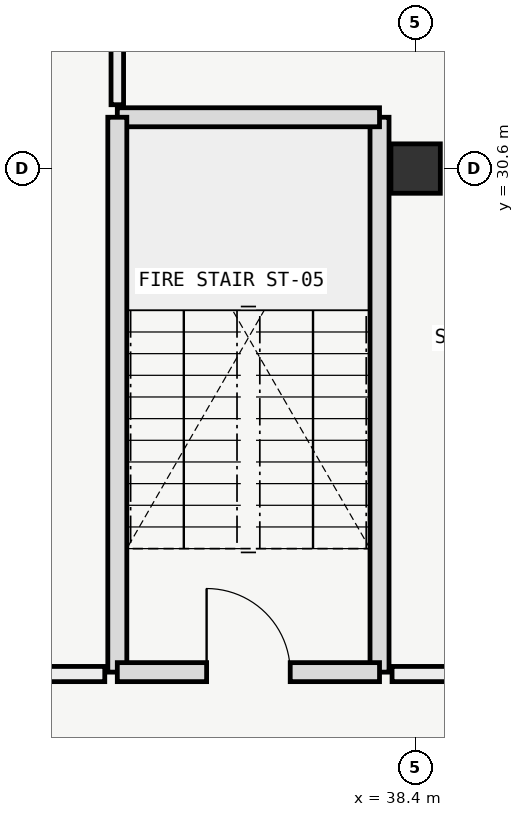
"""IFC4 building model, lengths in metres.
Left out: names, types, materials, properties, quantities, classifications, styles, units other than length and angle.
Written with IfcOpenShell. Run it as: python <this file> out.ifc"""

import sys

from ifc_helpers import new_model, si_unit, direction, frame, frame_2d, origin, origin_2d, place, context, subcontext, project, spatial, rectangle, extrude, element, fill, save


model = new_model("IFC4")
c1 = context("Model", 3, precision=1e-05, world=origin(), true_north=direction((0.0, 1.0)))
c2 = subcontext(c1, "Body", "Model", "MODEL_VIEW")
j1 = project(units=[si_unit("LENGTHUNIT", "METRE"), si_unit("PLANEANGLEUNIT", "RADIAN")], contexts=[c1])
p1 = place(None, origin())
s1 = spatial("IfcSite", under=j1, at=p1, CompositionType="ELEMENT")
p2 = place(p1, origin())
s2 = spatial("IfcBuilding", under=s1, at=p2, CompositionType="ELEMENT")
p3 = place(p2, frame((0.0, 0.0, 13.8)))
s3 = spatial("IfcBuildingStorey", under=s2, at=p3, CompositionType="ELEMENT", Elevation=13.8)
p4 = place(p3, frame((38.4, 30.6, 0.0), z_axis=(0.0, 0.0, 1.0), x_axis=(1.0, 0.0, 0.0)))
e1 = element("IfcColumn", 1, at=p4, inside=s3, PredefinedType="COLUMN", context=c2, shape_type="SweptSolid", body=[
    extrude(rectangle(XDim=0.65, YDim=0.65, at=origin_2d()), origin(), (0.0, 0.0, 1.0), 4.2),
])
p5 = place(p3, frame((37.925, 23.975, 0.0), z_axis=(0.0, 0.0, 1.0), x_axis=(0.0, 1.0, 0.0)))
e2 = element("IfcWall", 2, at=p5, inside=s3, PredefinedType="SOLIDWALL", context=c2, shape_type="SweptSolid", body=[
    extrude(rectangle(XDim=7.3, YDim=0.25, at=frame_2d((3.65, 0.0))), origin(), (0.0, 0.0, 1.0), 3.95),
])
p6 = place(p3, frame((37.925, 31.275, 0.0), z_axis=(0.0, 0.0, 1.0), x_axis=(-1.0, 0.0, 0.0)))
e3 = element("IfcWall", 3, at=p6, inside=s3, PredefinedType="SOLIDWALL", context=c2, shape_type="SweptSolid", body=[
    extrude(rectangle(XDim=3.45, YDim=0.25, at=frame_2d((1.725, 0.0))), origin(), (0.0, 0.0, 1.0), 3.95),
])
p7 = place(p3, frame((34.475, 31.275, 0.0), z_axis=(0.0, 0.0, 1.0), x_axis=(0.0, -1.0, 0.0)))
e4 = element("IfcWall", 4, at=p7, inside=s3, PredefinedType="SOLIDWALL", context=c2, shape_type="SweptSolid", body=[
    extrude(rectangle(XDim=7.3, YDim=0.25, at=frame_2d((3.65, 0.0))), origin(), (0.0, 0.0, 1.0), 3.95),
])
p8 = place(p3, frame((34.475, 23.975, 0.0), z_axis=(0.0, 0.0, 1.0), x_axis=(1.0, 0.0, 0.0)))
e5 = element("IfcWall", 5, at=p8, inside=s3, PredefinedType="SOLIDWALL", context=c2, shape_type="SweptSolid", body=[
    extrude(rectangle(XDim=3.45, YDim=0.25, at=frame_2d((1.725, 0.0))), origin(), (0.0, 0.0, 1.0), 3.95),
])
p9 = place(p8, frame((1.175, 0.0, 0.0)))
e6 = element("IfcOpeningElement", 6, at=p9, cuts=e5, PredefinedType="OPENING", context=c2, shape_type="SweptSolid", body=[
    extrude(rectangle(XDim=1.1, YDim=2.2, at=frame_2d((0.55, 1.1))), frame((0.0, 0.135, 0.0), z_axis=(0.0, -1.0, 0.0), x_axis=(1.0, 0.0, 0.0)), (0.0, 0.0, 1.0), 0.27),
])
p10 = place(p3, frame((27.325, 23.95, 0.0), z_axis=(0.0, 0.0, 1.0), x_axis=(1.0, 0.0, 0.0)))
e7 = element("IfcWall", 7, at=p10, inside=s3, PredefinedType="PARTITIONING", context=c2, shape_type="SweptSolid", body=[
    extrude(rectangle(XDim=6.985, YDim=0.2, at=frame_2d((3.493, 0.0))), origin(), (0.0, 0.0, 1.0), 3.28),
])
p11 = place(p10, frame((4.1, 0.0, 0.0)))
e8 = element("IfcOpeningElement", 8, at=p11, cuts=e7, PredefinedType="OPENING", context=c2, shape_type="SweptSolid", body=[
    extrude(rectangle(XDim=1.4, YDim=2.2, at=frame_2d((0.7, 1.1))), frame((0.0, 0.11, 0.0), z_axis=(0.0, -1.0, 0.0), x_axis=(1.0, 0.0, 0.0)), (0.0, 0.0, 1.0), 0.22),
])
p12 = place(p3, frame((34.475, 31.44, 0.0), z_axis=(0.0, 0.0, 1.0), x_axis=(0.0, 1.0, 0.0)))
e9 = element("IfcWall", 9, at=p12, inside=s3, PredefinedType="PARTITIONING", context=c2, shape_type="SweptSolid", body=[
    extrude(rectangle(XDim=9.21, YDim=0.165, at=frame_2d((4.605, 0.0))), origin(), (0.0, 0.0, 1.0), 3.43),
])
p13 = place(p3, frame((38.09, 23.95, 0.0), z_axis=(0.0, 0.0, 1.0), x_axis=(1.0, 0.0, 0.0)))
e10 = element("IfcWall", 10, at=p13, inside=s3, PredefinedType="PARTITIONING", context=c2, shape_type="SweptSolid", body=[
    extrude(rectangle(XDim=9.76, YDim=0.2, at=frame_2d((4.88, 0.0))), origin(), (0.0, 0.0, 1.0), 3.28),
])
p14 = place(p13, frame((3.235, 0.0, 0.0)))
e11 = element("IfcOpeningElement", 11, at=p14, cuts=e10, PredefinedType="OPENING", context=c2, shape_type="SweptSolid", body=[
    extrude(rectangle(XDim=0.95, YDim=2.1, at=frame_2d((0.475, 1.05))), frame((0.0, 0.11, 0.0), z_axis=(0.0, -1.0, 0.0), x_axis=(1.0, 0.0, 0.0)), (0.0, 0.0, 1.0), 0.22),
])
p15 = place(p9, origin())
e12 = element("IfcDoor", 12, at=p15, inside=s3, OperationType="SINGLE_SWING_LEFT", PredefinedType="DOOR", context=c2, shape_type="SweptSolid", body=[
    extrude(rectangle(XDim=1.1, YDim=2.2, at=frame_2d((0.55, 1.1))), frame((0.0, 0.025, 0.0), z_axis=(0.0, -1.0, 0.0), x_axis=(1.0, 0.0, 0.0)), (0.0, 0.0, 1.0), 0.05),
])
fill(e6, e12)
save(model, sys.argv[1])
